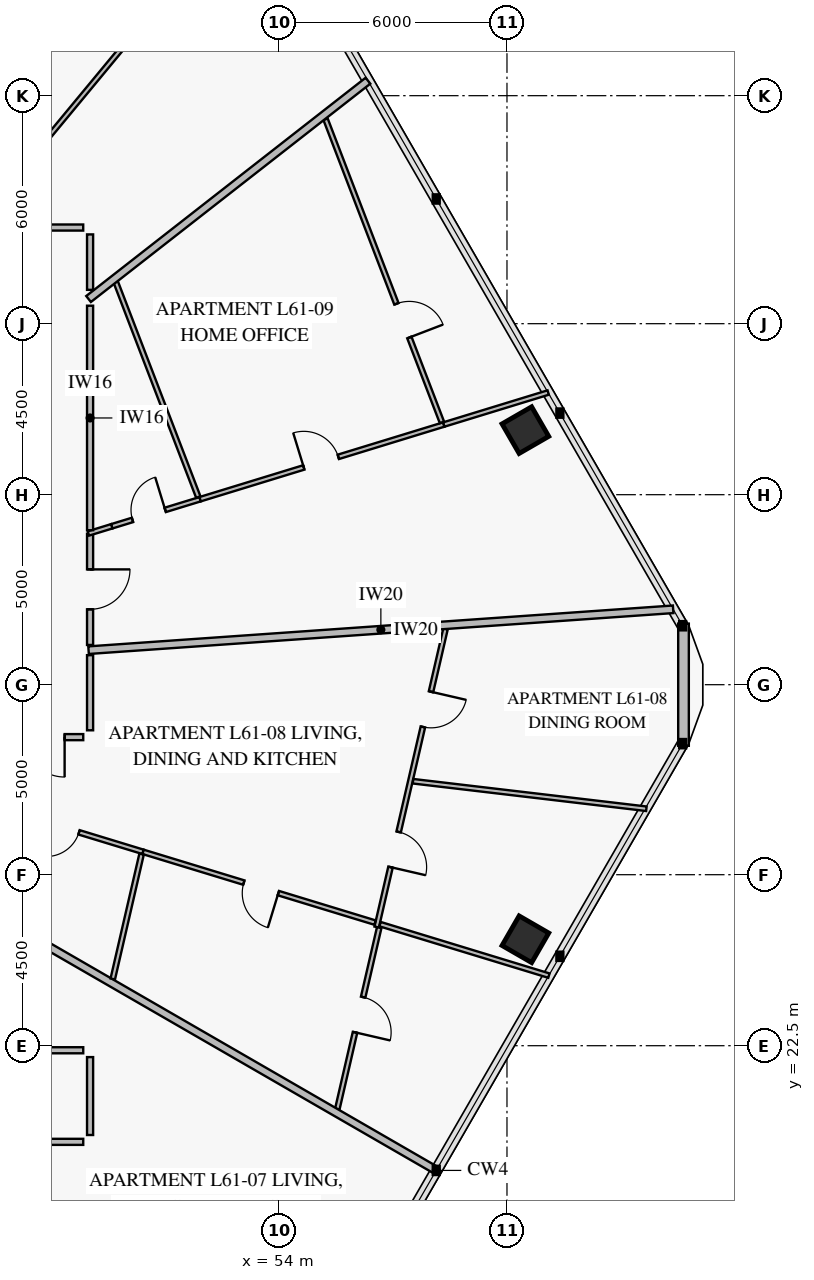
"""IFC4 building model, lengths in metres.
Left out: names, types, materials, properties, quantities, classifications, styles, units other than length and angle.
Written with IfcOpenShell. Run it as: python <this file> out.ifc"""

import sys

from ifc_helpers import new_model, si_unit, direction, frame, frame_2d, origin, origin_2d, place, context, subcontext, project, spatial, rectangle, extrude, element, fill, save


model = new_model("IFC4")
c1 = context("Model", 3, precision=1e-05, world=origin(), true_north=direction((0.0, 1.0)))
c2 = subcontext(c1, "Body", "Model", "MODEL_VIEW")
j1 = project(units=[si_unit("LENGTHUNIT", "METRE"), si_unit("PLANEANGLEUNIT", "RADIAN")], contexts=[c1])
p1 = place(None, origin())
s1 = spatial("IfcSite", under=j1, at=p1, CompositionType="ELEMENT")
p2 = place(p1, origin())
s2 = spatial("IfcBuilding", under=s1, at=p2, CompositionType="ELEMENT")
p3 = place(p2, frame((0.0, 0.0, 242.6)))
s3 = spatial("IfcBuildingStorey", under=s2, at=p3, CompositionType="ELEMENT", Elevation=242.6)
for number, where, z_axis, x_axis in (
    (1, (60.485, 38.699, 0.0), (0.0, 0.0, 1.0), (-0.5, 0.866, 0.0)),
    (2, (60.485, 25.301, 0.0), (0.0, 0.0, 1.0), (0.5, 0.866, 0.0)),
):
    element("IfcColumn", number, at=place(p3, frame(where, z_axis=z_axis, x_axis=x_axis)), inside=s3, PredefinedType="COLUMN", context=c2, shape_type="SweptSolid", body=[
        extrude(rectangle(XDim=0.9, YDim=0.9, at=origin_2d()), origin(), (0.0, 0.0, 1.0), 3.55),
    ])
p4 = place(p3, frame((64.645, 33.607, 0.0), z_axis=(0.0, 0.0, 1.0), x_axis=(0.0, -1.0, 0.0)))
e3 = element("IfcWall", 3, at=p4, inside=s3, PredefinedType="SOLIDWALL", context=c2, shape_type="SweptSolid", body=[
    extrude(rectangle(XDim=3.215, YDim=0.28, at=frame_2d((1.607, 0.0))), origin(), (0.0, 0.0, 1.0), 3.55),
])
p5 = place(p3, frame((45.357, 19.97, 0.0), z_axis=(0.0, 0.0, 1.0), x_axis=(1.0, 0.0, 0.0)))
e4 = element("IfcWall", 4, at=p5, inside=s3, PredefinedType="PARTITIONING", context=c2, shape_type="SweptSolid", body=[
    extrude(rectangle(XDim=3.493, YDim=0.16, at=frame_2d((1.747, 0.0))), origin(), (0.0, 0.0, 1.0), 2.95),
])
p6 = place(p5, frame((1.222, 0.0, 0.0)))
e5 = element("IfcOpeningElement", 5, at=p6, cuts=e4, PredefinedType="OPENING", context=c2, shape_type="SweptSolid", body=[
    extrude(rectangle(XDim=1.05, YDim=2.15, at=frame_2d((0.525, 1.075))), frame((0.0, 0.092, 0.0), z_axis=(0.0, -1.0, 0.0), x_axis=(1.0, 0.0, 0.0)), (0.0, 0.0, 1.0), 0.184),
])
p7 = place(p3, frame((56.571, 25.622, 0.0), z_axis=(0.0, 0.0, 1.0), x_axis=(0.224956917684, 0.974368711108, 0.0)))
e6 = element("IfcWall", 6, at=p7, inside=s3, PredefinedType="PARTITIONING", context=c2, shape_type="SweptSolid", body=[
    extrude(rectangle(XDim=8.054, YDim=0.12, at=frame_2d((4.027, 0.0))), origin(), (0.0, 0.0, 1.0), 2.95),
])
p8 = place(p7, frame((1.619, 0.0, 0.0)))
e7 = element("IfcOpeningElement", 7, at=p8, cuts=e6, PredefinedType="OPENING", context=c2, shape_type="SweptSolid", body=[
    extrude(rectangle(XDim=0.95, YDim=2.1, at=frame_2d((0.475, 1.05))), frame((0.0, 0.072, 0.0), z_axis=(0.0, -1.0, 0.0), x_axis=(1.0, 0.0, 0.0)), (0.0, 0.0, 1.0), 0.144),
])
p9 = place(p7, frame((5.406, 0.0, 0.0)))
e8 = element("IfcOpeningElement", 8, at=p9, cuts=e6, PredefinedType="OPENING", context=c2, shape_type="SweptSolid", body=[
    extrude(rectangle(XDim=0.95, YDim=2.1, at=frame_2d((0.475, 1.05))), frame((0.0, 0.072, 0.0), z_axis=(0.0, -1.0, 0.0), x_axis=(1.0, 0.0, 0.0)), (0.0, 0.0, 1.0), 0.144),
])
p10 = place(p3, frame((46.808, 28.704, 0.0), z_axis=(0.0, 0.0, 1.0), x_axis=(0.956504815911, -0.291716535594, 0.0)))
e9 = element("IfcWall", 9, at=p10, inside=s3, PredefinedType="PARTITIONING", context=c2, shape_type="SweptSolid", body=[
    extrude(rectangle(XDim=3.781, YDim=0.12, at=frame_2d((1.891, 0.0))), origin(), (0.0, 0.0, 1.0), 3.55),
])
p11 = place(p10, frame((1.119, 0.0, 0.0)))
e10 = element("IfcOpeningElement", 10, at=p11, cuts=e9, PredefinedType="OPENING", context=c2, shape_type="SweptSolid", body=[
    extrude(rectangle(XDim=0.9, YDim=2.1, at=frame_2d((0.45, 1.05))), frame((0.0, 0.072, 0.0), z_axis=(0.0, -1.0, 0.0), x_axis=(1.0, 0.0, 0.0)), (0.0, 0.0, 1.0), 0.144),
])
p12 = place(p3, frame((50.425, 27.601, 0.0), z_axis=(0.0, 0.0, 1.0), x_axis=(0.956517137307, -0.291676132103, 0.0)))
e11 = element("IfcWall", 11, at=p12, inside=s3, PredefinedType="PARTITIONING", context=c2, shape_type="SweptSolid", body=[
    extrude(rectangle(XDim=6.382, YDim=0.12, at=frame_2d((3.191, 0.0))), origin(), (0.0, 0.0, 1.0), 3.15),
])
p13 = place(p12, frame((2.771, 0.0, 0.0)))
e12 = element("IfcOpeningElement", 12, at=p13, cuts=e11, PredefinedType="OPENING", context=c2, shape_type="SweptSolid", body=[
    extrude(rectangle(XDim=0.95, YDim=2.1, at=frame_2d((0.475, 1.05))), frame((0.0, 0.072, 0.0), z_axis=(0.0, -1.0, 0.0), x_axis=(1.0, 0.0, 0.0)), (0.0, 0.0, 1.0), 0.144),
])
p14 = place(p3, frame((55.535, 20.833, 0.0), z_axis=(0.0, 0.0, 1.0), x_axis=(0.224979599368, 0.974363474207, 0.0)))
e13 = element("IfcWall", 13, at=p14, inside=s3, PredefinedType="PARTITIONING", context=c2, shape_type="SweptSolid", body=[
    extrude(rectangle(XDim=4.899, YDim=0.12, at=frame_2d((2.45, 0.0))), origin(), (0.0, 0.0, 1.0), 3.55),
])
p15 = place(p14, frame((2.073, 0.0, 0.0)))
e14 = element("IfcOpeningElement", 14, at=p15, cuts=e13, PredefinedType="OPENING", context=c2, shape_type="SweptSolid", body=[
    extrude(rectangle(XDim=0.95, YDim=2.1, at=frame_2d((0.475, 1.05))), frame((0.0, 0.072, 0.0), z_axis=(0.0, -1.0, 0.0), x_axis=(1.0, 0.0, 0.0)), (0.0, 0.0, 1.0), 0.144),
])
p16 = place(p3, frame((46.82, 30.62, 0.0), z_axis=(0.0, 0.0, 1.0), x_axis=(1.0, 0.0, 0.0)))
e15 = element("IfcWall", 15, at=p16, inside=s3, PredefinedType="PARTITIONING", context=c2, shape_type="SweptSolid", body=[
    extrude(rectangle(XDim=2.03, YDim=0.16, at=frame_2d((1.015, 0.0))), origin(), (0.0, 0.0, 1.0), 3.55),
])
p17 = place(p16, frame((0.49, 0.0, 0.0)))
e16 = element("IfcOpeningElement", 16, at=p17, cuts=e15, PredefinedType="OPENING", context=c2, shape_type="SweptSolid", body=[
    extrude(rectangle(XDim=1.05, YDim=2.15, at=frame_2d((0.525, 1.075))), frame((0.0, 0.092, 0.0), z_axis=(0.0, -1.0, 0.0), x_axis=(1.0, 0.0, 0.0)), (0.0, 0.0, 1.0), 0.184),
])
p18 = place(p3, frame((49.6, 36.168, 0.0), z_axis=(0.0, 0.0, 1.0), x_axis=(0.956099580732, 0.293041962395, 0.0)))
e17 = element("IfcWall", 17, at=p18, inside=s3, PredefinedType="PARTITIONING", context=c2, shape_type="SweptSolid", body=[
    extrude(rectangle(XDim=2.433, YDim=0.12, at=frame_2d((1.216, 0.0))), origin(), (0.0, 0.0, 1.0), 3.55),
])
p19 = place(p18, frame((0.572, 0.0, 0.0)))
e18 = element("IfcOpeningElement", 18, at=p19, cuts=e17, PredefinedType="OPENING", context=c2, shape_type="SweptSolid", body=[
    extrude(rectangle(XDim=0.9, YDim=2.1, at=frame_2d((0.45, 1.05))), frame((0.0, 0.072, 0.0), z_axis=(0.0, -1.0, 0.0), x_axis=(1.0, 0.0, 0.0)), (0.0, 0.0, 1.0), 0.144),
])
p20 = place(p3, frame((51.926, 36.881, 0.0), z_axis=(0.0, 0.0, 1.0), x_axis=(0.956092574373, 0.293064820866, 0.0)))
e19 = element("IfcWall", 19, at=p20, inside=s3, PredefinedType="PARTITIONING", context=c2, shape_type="SweptSolid", body=[
    extrude(rectangle(XDim=6.705, YDim=0.12, at=frame_2d((3.353, 0.0))), origin(), (0.0, 0.0, 1.0), 3.15),
])
p21 = place(p20, frame((2.853, 0.0, 0.0)))
e20 = element("IfcOpeningElement", 20, at=p21, cuts=e19, PredefinedType="OPENING", context=c2, shape_type="SweptSolid", body=[
    extrude(rectangle(XDim=0.95, YDim=2.1, at=frame_2d((0.475, 1.05))), frame((0.0, 0.072, 0.0), z_axis=(0.0, -1.0, 0.0), x_axis=(1.0, 0.0, 0.0)), (0.0, 0.0, 1.0), 0.144),
])
p22 = place(p3, frame((58.289, 38.903, 0.0), z_axis=(0.0, 0.0, 1.0), x_axis=(-0.358377768056, 0.933576657465, 0.0)))
e21 = element("IfcWall", 21, at=p22, inside=s3, PredefinedType="PARTITIONING", context=c2, shape_type="SweptSolid", body=[
    extrude(rectangle(XDim=8.544, YDim=0.12, at=frame_2d((4.272, 0.0))), origin(), (0.0, 0.0, 1.0), 3.55),
])
p23 = place(p22, frame((2.393, 0.0, 0.0)))
e22 = element("IfcOpeningElement", 22, at=p23, cuts=e21, PredefinedType="OPENING", context=c2, shape_type="SweptSolid", body=[
    extrude(rectangle(XDim=0.95, YDim=2.1, at=frame_2d((0.475, 1.05))), frame((0.0, 0.072, 0.0), z_axis=(0.0, -1.0, 0.0), x_axis=(1.0, 0.0, 0.0)), (0.0, 0.0, 1.0), 0.144),
])
p24 = place(p3, frame((49.03, 33.045, 0.0), z_axis=(0.0, 0.0, 1.0), x_axis=(0.0, 1.0, 0.0)))
e23 = element("IfcWall", 23, at=p24, inside=s3, PredefinedType="PARTITIONING", context=c2, shape_type="SweptSolid", body=[
    extrude(rectangle(XDim=2.927, YDim=0.16, at=frame_2d((1.464, 0.0))), origin(), (0.0, 0.0, 1.0), 2.95),
])
p25 = place(p24, frame((0.939, 0.0, 0.0)))
e24 = element("IfcOpeningElement", 24, at=p25, cuts=e23, PredefinedType="OPENING", context=c2, shape_type="SweptSolid", body=[
    extrude(rectangle(XDim=1.05, YDim=2.15, at=frame_2d((0.525, 1.075))), frame((0.0, 0.092, 0.0), z_axis=(0.0, -1.0, 0.0), x_axis=(1.0, 0.0, 0.0)), (0.0, 0.0, 1.0), 0.184),
])
p26 = place(p3, frame((48.849, 44.03, 0.0), z_axis=(0.0, 0.0, 1.0), x_axis=(-1.0, 0.0, 0.0)))
e25 = element("IfcWall", 25, at=p26, inside=s3, PredefinedType="PARTITIONING", context=c2, shape_type="SweptSolid", body=[
    extrude(rectangle(XDim=2.864, YDim=0.16, at=frame_2d((1.432, 0.0))), origin(), (0.0, 0.0, 1.0), 2.95),
])
p27 = place(p26, frame((0.907, 0.0, 0.0)))
e26 = element("IfcOpeningElement", 26, at=p27, cuts=e25, PredefinedType="OPENING", context=c2, shape_type="SweptSolid", body=[
    extrude(rectangle(XDim=1.05, YDim=2.15, at=frame_2d((0.525, 1.075))), frame((0.0, 0.092, 0.0), z_axis=(0.0, -1.0, 0.0), x_axis=(1.0, 0.0, 0.0)), (0.0, 0.0, 1.0), 0.184),
])
p28 = place(p3, frame((46.808, 25.76, 0.0), z_axis=(0.0, 0.0, 1.0), x_axis=(0.86602399778, -0.500002435262, 0.0)))
e27 = element("IfcWall", 27, at=p28, inside=s3, PredefinedType="PARTITIONING", context=c2, shape_type="SweptSolid", body=[
    extrude(rectangle(XDim=13.083, YDim=0.2, at=frame_2d((6.542, 0.0))), origin(), (0.0, 0.0, 1.0), 2.93),
])
p29 = place(p3, frame((57.527, 29.46, 0.0), z_axis=(0.0, 0.0, 1.0), x_axis=(0.993110118833, -0.117184861953, 0.0)))
e28 = element("IfcWall", 28, at=p29, inside=s3, PredefinedType="PARTITIONING", context=c2, shape_type="SweptSolid", body=[
    extrude(rectangle(XDim=6.184, YDim=0.12, at=frame_2d((3.092, 0.0))), origin(), (0.0, 0.0, 1.0), 2.93),
])
p30 = place(p3, frame((56.659, 25.7, 0.0), z_axis=(0.0, 0.0, 1.0), x_axis=(0.9564987051, -0.291736571484, 0.0)))
e29 = element("IfcWall", 29, at=p30, inside=s3, PredefinedType="PARTITIONING", context=c2, shape_type="SweptSolid", body=[
    extrude(rectangle(XDim=4.646, YDim=0.12, at=frame_2d((2.323, 0.0))), origin(), (0.0, 0.0, 1.0), 2.93),
])
p31 = place(p3, frame((49.627, 24.257, 0.0), z_axis=(0.0, 0.0, 1.0), x_axis=(0.224944134333, 0.97437166237, 0.0)))
e30 = element("IfcWall", 30, at=p31, inside=s3, PredefinedType="PARTITIONING", context=c2, shape_type="SweptSolid", body=[
    extrude(rectangle(XDim=3.371, YDim=0.12, at=frame_2d((1.686, 0.0))), origin(), (0.0, 0.0, 1.0), 3.55),
])
p32 = place(p3, frame((48.99, 32.908, 0.0), z_axis=(0.0, 0.0, 1.0), x_axis=(0.997563993595, 0.069757284087, 0.0)))
e31 = element("IfcWall", 31, at=p32, inside=s3, PredefinedType="PARTITIONING", context=c2, shape_type="SweptSolid", body=[
    extrude(rectangle(XDim=15.42, YDim=0.2, at=frame_2d((7.71, 0.0))), origin(), (0.0, 0.0, 1.0), 2.93),
])
p33 = place(p3, frame((48.986, 35.98, 0.0), z_axis=(0.0, 0.0, 1.0), x_axis=(0.956189096287, 0.292749743197, 0.0)))
e32 = element("IfcWall", 32, at=p33, inside=s3, PredefinedType="PARTITIONING", context=c2, shape_type="SweptSolid", body=[
    extrude(rectangle(XDim=0.642, YDim=0.12, at=frame_2d((0.321, 0.0))), origin(), (0.0, 0.0, 1.0), 3.55),
])
p34 = place(p3, frame((58.337, 38.846, 0.0), z_axis=(0.0, 0.0, 1.0), x_axis=(0.956107218271, 0.293017042457, 0.0)))
e33 = element("IfcWall", 33, at=p34, inside=s3, PredefinedType="PARTITIONING", context=c2, shape_type="SweptSolid", body=[
    extrude(rectangle(XDim=2.874, YDim=0.12, at=frame_2d((1.437, 0.0))), origin(), (0.0, 0.0, 1.0), 2.93),
])
p35 = place(p3, frame((51.878, 36.938, 0.0), z_axis=(0.0, 0.0, 1.0), x_axis=(-0.358346020199, 0.933588844089, 0.0)))
e34 = element("IfcWall", 34, at=p35, inside=s3, PredefinedType="PARTITIONING", context=c2, shape_type="SweptSolid", body=[
    extrude(rectangle(XDim=6.1, YDim=0.12, at=frame_2d((3.05, 0.0))), origin(), (0.0, 0.0, 1.0), 3.55),
])
p36 = place(p3, frame((48.99, 42.149, 0.0), z_axis=(0.0, 0.0, 1.0), x_axis=(0.788003348051, 0.615670953887, 0.0)))
e35 = element("IfcWall", 35, at=p36, inside=s3, PredefinedType="PARTITIONING", context=c2, shape_type="SweptSolid", body=[
    extrude(rectangle(XDim=9.33, YDim=0.2, at=frame_2d((4.665, 0.0))), origin(), (0.0, 0.0, 1.0), 2.93),
])
p37 = place(p3, frame((45.596, 47.017, 0.0), z_axis=(0.0, 0.0, 1.0), x_axis=(0.538471979817, 0.842643416252, 0.0)))
e36 = element("IfcWall", 36, at=p37, inside=s3, PredefinedType="PARTITIONING", context=c2, shape_type="SweptSolid", body=[
    extrude(rectangle(XDim=10.947, YDim=0.12, at=frame_2d((5.474, 0.0))), origin(), (0.0, 0.0, 1.0), 2.93),
])
p38 = place(p3, frame((43.684, 48.08, 0.0), z_axis=(0.0, 0.0, 1.0), x_axis=(0.431150039007, 0.902280246855, 0.0)))
e37 = element("IfcWall", 37, at=p38, inside=s3, PredefinedType="PARTITIONING", context=c2, shape_type="SweptSolid", body=[
    extrude(rectangle(XDim=10.521, YDim=0.12, at=frame_2d((5.261, 0.0))), origin(), (0.0, 0.0, 1.0), 2.93),
])
p39 = place(p3, frame((47.539, 45.938, 0.0), z_axis=(0.0, 0.0, 1.0), x_axis=(0.637687358295, 0.770295289529, 0.0)))
e38 = element("IfcWall", 38, at=p39, inside=s3, PredefinedType="PARTITIONING", context=c2, shape_type="SweptSolid", body=[
    extrude(rectangle(XDim=9.187, YDim=0.12, at=frame_2d((4.594, 0.0))), origin(), (0.0, 0.0, 1.0), 2.93),
])
p40 = place(p3, frame((49.03, 20.15, 0.0), z_axis=(0.0, 0.0, 1.0), x_axis=(0.0, 1.0, 0.0)))
e39 = element("IfcWall", 39, at=p40, inside=s3, PredefinedType="PARTITIONING", context=c2, shape_type="SweptSolid", body=[
    extrude(rectangle(XDim=2.05, YDim=0.16, at=frame_2d((1.025, 0.0))), origin(), (0.0, 0.0, 1.0), 3.55),
])
p41 = place(p3, frame((48.85, 22.38, 0.0), z_axis=(0.0, 0.0, 1.0), x_axis=(-1.0, 0.0, 0.0)))
e40 = element("IfcWall", 40, at=p41, inside=s3, PredefinedType="PARTITIONING", context=c2, shape_type="SweptSolid", body=[
    extrude(rectangle(XDim=2.03, YDim=0.16, at=frame_2d((1.015, 0.0))), origin(), (0.0, 0.0, 1.0), 3.55),
])
p42 = place(p3, frame((49.03, 30.8, 0.0), z_axis=(0.0, 0.0, 1.0), x_axis=(0.0, 1.0, 0.0)))
e41 = element("IfcWall", 41, at=p42, inside=s3, PredefinedType="PARTITIONING", context=c2, shape_type="SweptSolid", body=[
    extrude(rectangle(XDim=1.977, YDim=0.16, at=frame_2d((0.988, 0.0))), origin(), (0.0, 0.0, 1.0), 3.55),
])
p43 = place(p3, frame((49.03, 36.065, 0.0), z_axis=(0.0, 0.0, 1.0), x_axis=(0.0, 1.0, 0.0)))
e42 = element("IfcWall", 42, at=p43, inside=s3, PredefinedType="PARTITIONING", context=c2, shape_type="SweptSolid", body=[
    extrude(rectangle(XDim=5.908, YDim=0.16, at=frame_2d((2.954, 0.0))), origin(), (0.0, 0.0, 1.0), 3.55),
])
p44 = place(p3, frame((49.03, 42.39, 0.0), z_axis=(0.0, 0.0, 1.0), x_axis=(0.0, 1.0, 0.0)))
e43 = element("IfcWall", 43, at=p44, inside=s3, PredefinedType="PARTITIONING", context=c2, shape_type="SweptSolid", body=[
    extrude(rectangle(XDim=1.459, YDim=0.16, at=frame_2d((0.729, 0.0))), origin(), (0.0, 0.0, 1.0), 3.55),
])
p45 = place(p8, frame((0.95, 0.0, 0.0), z_axis=(0.0, 0.0, 1.0), x_axis=(-1.0, 0.0, 0.0)))
e44 = element("IfcDoor", 44, at=p45, inside=s3, OperationType="SINGLE_SWING_RIGHT", PredefinedType="DOOR", context=c2, shape_type="SweptSolid", body=[
    extrude(rectangle(XDim=0.95, YDim=2.1, at=frame_2d((0.475, 1.05))), frame((0.0, 0.025, 0.0), z_axis=(0.0, -1.0, 0.0), x_axis=(1.0, 0.0, 0.0)), (0.0, 0.0, 1.0), 0.05),
])
fill(e7, e44)
p46 = place(p9, frame((0.95, 0.0, 0.0), z_axis=(0.0, 0.0, 1.0), x_axis=(-1.0, 0.0, 0.0)))
e45 = element("IfcDoor", 45, at=p46, inside=s3, OperationType="SINGLE_SWING_LEFT", PredefinedType="DOOR", context=c2, shape_type="SweptSolid", body=[
    extrude(rectangle(XDim=0.95, YDim=2.1, at=frame_2d((0.475, 1.05))), frame((0.0, 0.025, 0.0), z_axis=(0.0, -1.0, 0.0), x_axis=(1.0, 0.0, 0.0)), (0.0, 0.0, 1.0), 0.05),
])
fill(e8, e45)
p47 = place(p11, frame((0.9, 0.0, 0.0), z_axis=(0.0, 0.0, 1.0), x_axis=(-1.0, 0.0, 0.0)))
e46 = element("IfcDoor", 46, at=p47, inside=s3, OperationType="SINGLE_SWING_RIGHT", PredefinedType="DOOR", context=c2, shape_type="SweptSolid", body=[
    extrude(rectangle(XDim=0.9, YDim=2.1, at=frame_2d((0.45, 1.05))), frame((0.0, 0.025, 0.0), z_axis=(0.0, -1.0, 0.0), x_axis=(1.0, 0.0, 0.0)), (0.0, 0.0, 1.0), 0.05),
])
fill(e10, e46)
p48 = place(p13, frame((0.95, 0.0, 0.0), z_axis=(0.0, 0.0, 1.0), x_axis=(-1.0, 0.0, 0.0)))
e47 = element("IfcDoor", 47, at=p48, inside=s3, OperationType="SINGLE_SWING_LEFT", PredefinedType="DOOR", context=c2, shape_type="SweptSolid", body=[
    extrude(rectangle(XDim=0.95, YDim=2.1, at=frame_2d((0.475, 1.05))), frame((0.0, 0.025, 0.0), z_axis=(0.0, -1.0, 0.0), x_axis=(1.0, 0.0, 0.0)), (0.0, 0.0, 1.0), 0.05),
])
fill(e12, e47)
p49 = place(p15, frame((0.95, 0.0, 0.0), z_axis=(0.0, 0.0, 1.0), x_axis=(-1.0, 0.0, 0.0)))
e48 = element("IfcDoor", 48, at=p49, inside=s3, OperationType="SINGLE_SWING_RIGHT", PredefinedType="DOOR", context=c2, shape_type="SweptSolid", body=[
    extrude(rectangle(XDim=0.95, YDim=2.1, at=frame_2d((0.475, 1.05))), frame((0.0, 0.025, 0.0), z_axis=(0.0, -1.0, 0.0), x_axis=(1.0, 0.0, 0.0)), (0.0, 0.0, 1.0), 0.05),
])
fill(e14, e48)
p50 = place(p17, frame((1.05, 0.0, 0.0), z_axis=(0.0, 0.0, 1.0), x_axis=(-1.0, 0.0, 0.0)))
e49 = element("IfcDoor", 49, at=p50, inside=s3, OperationType="SINGLE_SWING_LEFT", PredefinedType="DOOR", context=c2, shape_type="SweptSolid", body=[
    extrude(rectangle(XDim=1.05, YDim=2.15, at=frame_2d((0.525, 1.075))), frame((0.0, 0.025, 0.0), z_axis=(0.0, -1.0, 0.0), x_axis=(1.0, 0.0, 0.0)), (0.0, 0.0, 1.0), 0.05),
])
fill(e16, e49)
p51 = place(p19, origin())
e50 = element("IfcDoor", 50, at=p51, inside=s3, OperationType="SINGLE_SWING_RIGHT", PredefinedType="DOOR", context=c2, shape_type="SweptSolid", body=[
    extrude(rectangle(XDim=0.9, YDim=2.1, at=frame_2d((0.45, 1.05))), frame((0.0, 0.025, 0.0), z_axis=(0.0, -1.0, 0.0), x_axis=(1.0, 0.0, 0.0)), (0.0, 0.0, 1.0), 0.05),
])
fill(e18, e50)
p52 = place(p21, origin())
e51 = element("IfcDoor", 51, at=p52, inside=s3, OperationType="SINGLE_SWING_LEFT", PredefinedType="DOOR", context=c2, shape_type="SweptSolid", body=[
    extrude(rectangle(XDim=0.95, YDim=2.1, at=frame_2d((0.475, 1.05))), frame((0.0, 0.025, 0.0), z_axis=(0.0, -1.0, 0.0), x_axis=(1.0, 0.0, 0.0)), (0.0, 0.0, 1.0), 0.05),
])
fill(e20, e51)
p53 = place(p23, frame((0.95, 0.0, 0.0), z_axis=(0.0, 0.0, 1.0), x_axis=(-1.0, 0.0, 0.0)))
e52 = element("IfcDoor", 52, at=p53, inside=s3, OperationType="SINGLE_SWING_RIGHT", PredefinedType="DOOR", context=c2, shape_type="SweptSolid", body=[
    extrude(rectangle(XDim=0.95, YDim=2.1, at=frame_2d((0.475, 1.05))), frame((0.0, 0.025, 0.0), z_axis=(0.0, -1.0, 0.0), x_axis=(1.0, 0.0, 0.0)), (0.0, 0.0, 1.0), 0.05),
])
fill(e22, e52)
p54 = place(p25, frame((1.05, 0.0, 0.0), z_axis=(0.0, 0.0, 1.0), x_axis=(-1.0, 0.0, 0.0)))
e53 = element("IfcDoor", 53, at=p54, inside=s3, OperationType="SINGLE_SWING_LEFT", PredefinedType="DOOR", context=c2, shape_type="SweptSolid", body=[
    extrude(rectangle(XDim=1.05, YDim=2.15, at=frame_2d((0.525, 1.075))), frame((0.0, 0.025, 0.0), z_axis=(0.0, -1.0, 0.0), x_axis=(1.0, 0.0, 0.0)), (0.0, 0.0, 1.0), 0.05),
])
fill(e24, e53)
save(model, sys.argv[1])
